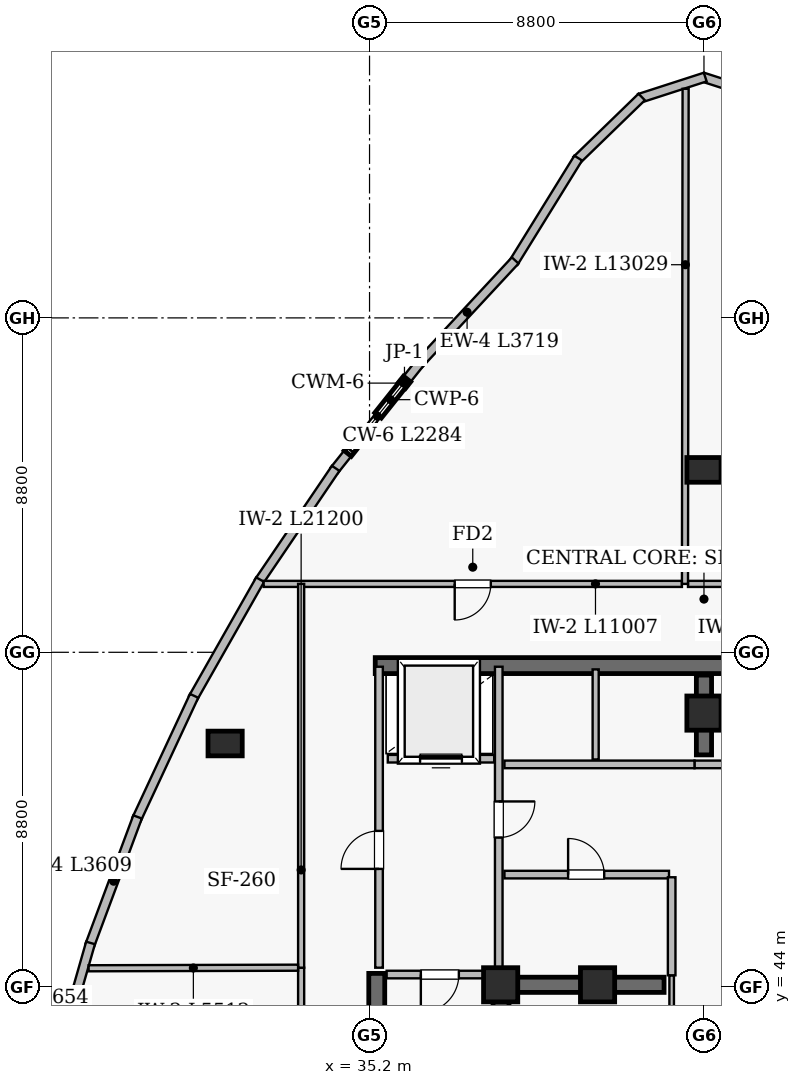
"""IFC4 building model, lengths in metres.
Left out: names, types, materials, properties, quantities, classifications, styles, units other than length and angle.
Written with IfcOpenShell. Run it as: python <this file> out.ifc"""

import sys

from ifc_helpers import new_model, si_unit, direction, frame, frame_2d, origin, origin_2d, place, context, subcontext, project, spatial, rectangle, extrude, element, fill, save


model = new_model("IFC4")
c1 = context("Model", 3, precision=1e-05, world=origin(), true_north=direction((0.0, 1.0)))
c2 = subcontext(c1, "Body", "Model", "MODEL_VIEW")
j1 = project(units=[si_unit("LENGTHUNIT", "METRE"), si_unit("PLANEANGLEUNIT", "RADIAN")], contexts=[c1])
p1 = place(None, origin())
s1 = spatial("IfcSite", under=j1, at=p1, CompositionType="ELEMENT")
p2 = place(p1, origin())
s2 = spatial("IfcBuilding", under=s1, at=p2, CompositionType="ELEMENT")
p3 = place(p2, frame((0.0, 0.0, 300.8)))
s3 = spatial("IfcBuildingStorey", under=s2, at=p3, CompositionType="ELEMENT", Elevation=300.8)
p4 = place(p3, frame((35.35, 52.45, 0.0), z_axis=(0.0, 0.0, 1.0), x_axis=(1.0, 0.0, 0.0)))
e1 = element("IfcWall", 1, at=p4, inside=s3, PredefinedType="SHEAR", context=c2, shape_type="SweptSolid", body=[
    extrude(rectangle(XDim=17.3, YDim=0.42, at=frame_2d((8.65, 0.0))), origin(), (0.0, 0.0, 1.0), 5.74),
])
p5 = place(p3, frame((35.39, 35.18, 0.0), z_axis=(0.0, 0.0, 1.0), x_axis=(0.0, 1.0, 0.0)))
e2 = element("IfcWall", 2, at=p5, inside=s3, PredefinedType="SHEAR", context=c2, shape_type="SweptSolid", body=[
    extrude(rectangle(XDim=9.17, YDim=0.42, at=frame_2d((4.585, 0.0))), origin(), (0.0, 0.0, 1.0), 5.74),
])
p6 = place(p3, frame((38.66, 35.4, 0.0), z_axis=(0.0, 0.0, 1.0), x_axis=(0.0, 1.0, 0.0)))
e3 = element("IfcWall", 3, at=p6, inside=s3, PredefinedType="SHEAR", context=c2, shape_type="SweptSolid", body=[
    extrude(rectangle(XDim=8.95, YDim=0.42, at=frame_2d((4.475, 0.0))), origin(), (0.0, 0.0, 1.0), 5.74),
])
p7 = place(p3, frame((44.0, 50.1, 0.0), z_axis=(0.0, 0.0, 1.0), x_axis=(0.0, 1.0, 0.0)))
e4 = element("IfcWall", 4, at=p7, inside=s3, PredefinedType="SHEAR", context=c2, shape_type="SweptSolid", body=[
    extrude(rectangle(XDim=2.1, YDim=0.4, at=frame_2d((1.05, 0.0))), origin(), (0.0, 0.0, 1.0), 5.74),
])
p8 = place(p3, frame((38.75, 44.05, 0.0), z_axis=(0.0, 0.0, 1.0), x_axis=(1.0, 0.0, 0.0)))
e5 = element("IfcWall", 5, at=p8, inside=s3, PredefinedType="SHEAR", context=c2, shape_type="SweptSolid", body=[
    extrude(rectangle(XDim=4.2, YDim=0.4, at=frame_2d((2.1, 0.0))), origin(), (0.0, 0.0, 1.0), 5.74),
])
for number, where, z_axis, x_axis in (
    (6, (38.65, 44.05, 0.0), (0.0, 0.0, 1.0), (1.0, 0.0, 0.0)),
    (7, (44.0, 51.2, 0.0), (0.0, 0.0, 1.0), (1.0, 0.0, 0.0)),
    (8, (41.2, 44.05, 0.0), (0.0, 0.0, 1.0), (1.0, 0.0, 0.0)),
):
    element("IfcColumn", number, at=place(p3, frame(where, z_axis=z_axis, x_axis=x_axis)), inside=s3, PredefinedType="COLUMN", context=c2, shape_type="SweptSolid", body=[
        extrude(rectangle(XDim=0.9, YDim=0.9, at=origin_2d()), origin(), (0.0, 0.0, 1.0), 6.0),
    ])
for number, where, z_axis, x_axis in (
    (9, (44.0, 57.6, 0.0), (0.0, 0.0, 1.0), (1.0, 0.0, 0.0)),
    (10, (31.4, 50.4, 0.0), (0.0, 0.0, 1.0), (1.0, 0.0, 0.0)),
):
    element("IfcColumn", number, at=place(p3, frame(where, z_axis=z_axis, x_axis=x_axis)), inside=s3, PredefinedType="COLUMN", context=c2, shape_type="SweptSolid", body=[
        extrude(rectangle(XDim=0.9, YDim=0.65, at=origin_2d()), origin(), (0.0, 0.0, 1.0), 6.0),
    ])
for number, where, z_axis, x_axis in (
    (11, (45.697, 67.378, 0.0), (0.0, 0.0, 1.0), (-0.952, 0.308, 0.0)),
    (12, (44.033, 67.938, 0.0), (0.0, 0.0, 1.0), (-0.952, -0.308, 0.0)),
):
    element("IfcWall", number, at=place(p3, frame(where, z_axis=z_axis, x_axis=x_axis)), inside=s3, PredefinedType="SOLIDWALL", context=c2, shape_type="SweptSolid", body=[
        extrude(rectangle(XDim=1.818, YDim=0.24, at=frame_2d((0.909, 0.0))), origin(), (0.0, 0.0, 1.0), 5.74),
    ])
p9 = place(p3, frame((42.361, 67.414, 0.0), z_axis=(0.0, 0.0, 1.0), x_axis=(-0.717711443968, -0.69634063733, 0.0)))
e13 = element("IfcWall", 13, at=p9, inside=s3, PredefinedType="SOLIDWALL", context=c2, shape_type="SweptSolid", body=[
    extrude(rectangle(XDim=2.388, YDim=0.24, at=frame_2d((1.194, 0.0))), origin(), (0.0, 0.0, 1.0), 5.74),
])
p10 = place(p3, frame((40.691, 65.805, 0.0), z_axis=(0.0, 0.0, 1.0), x_axis=(-0.526110187608, -0.850416410058, 0.0)))
e14 = element("IfcWall", 14, at=p10, inside=s3, PredefinedType="SOLIDWALL", context=c2, shape_type="SweptSolid", body=[
    extrude(rectangle(XDim=3.233, YDim=0.24, at=frame_2d((1.616, 0.0))), origin(), (0.0, 0.0, 1.0), 5.74),
])
p11 = place(p3, frame((39.033, 63.112, 0.0), z_axis=(0.0, 0.0, 1.0), x_axis=(-0.68087147599, -0.732402917241, 0.0)))
e15 = element("IfcWall", 15, at=p11, inside=s3, PredefinedType="SOLIDWALL", context=c2, shape_type="SweptSolid", body=[
    extrude(rectangle(XDim=3.719, YDim=0.24, at=frame_2d((1.859, 0.0))), origin(), (0.0, 0.0, 1.0), 5.74),
])
p12 = place(p3, frame((36.546, 60.441, 0.0), z_axis=(0.0, 0.0, 1.0), x_axis=(-0.623554366926, -0.781779989183, 0.0)))
e16 = element("IfcWall", 16, at=p12, inside=s3, PredefinedType="SOLIDWALL", context=c2, shape_type="SweptSolid", body=[
    extrude(rectangle(XDim=0.705, YDim=0.24, at=frame_2d((0.353, 0.0))), origin(), (0.0, 0.0, 1.0), 5.74),
])
p13 = place(p3, frame((34.707, 58.135, 0.0), z_axis=(0.0, 0.0, 1.0), x_axis=(-0.62368040626, -0.781679442513, 0.0)))
e17 = element("IfcWall", 17, at=p13, inside=s3, PredefinedType="SOLIDWALL", context=c2, shape_type="SweptSolid", body=[
    extrude(rectangle(XDim=0.705, YDim=0.24, at=frame_2d((0.352, 0.0))), origin(), (0.0, 0.0, 1.0), 5.74),
])
p14 = place(p3, frame((34.309, 57.641, 0.0), z_axis=(0.0, 0.0, 1.0), x_axis=(-0.560819727484, -0.827937940467, 0.0)))
e18 = element("IfcWall", 18, at=p14, inside=s3, PredefinedType="SOLIDWALL", context=c2, shape_type="SweptSolid", body=[
    extrude(rectangle(XDim=3.609, YDim=0.24, at=frame_2d((1.805, 0.0))), origin(), (0.0, 0.0, 1.0), 5.74),
])
p15 = place(p3, frame((32.322, 54.712, 0.0), z_axis=(0.0, 0.0, 1.0), x_axis=(-0.49340236427, -0.869801188165, 0.0)))
e19 = element("IfcWall", 19, at=p15, inside=s3, PredefinedType="SOLIDWALL", context=c2, shape_type="SweptSolid", body=[
    extrude(rectangle(XDim=3.587, YDim=0.24, at=frame_2d((1.793, 0.0))), origin(), (0.0, 0.0, 1.0), 5.74),
])
p16 = place(p3, frame((30.584, 51.654, 0.0), z_axis=(0.0, 0.0, 1.0), x_axis=(-0.422322757118, -0.906445524464, 0.0)))
e20 = element("IfcWall", 20, at=p16, inside=s3, PredefinedType="SOLIDWALL", context=c2, shape_type="SweptSolid", body=[
    extrude(rectangle(XDim=3.587, YDim=0.24, at=frame_2d((1.793, 0.0))), origin(), (0.0, 0.0, 1.0), 5.74),
])
p17 = place(p3, frame((29.096, 48.467, 0.0), z_axis=(0.0, 0.0, 1.0), x_axis=(-0.349054279873, -0.937102507574, 0.0)))
e21 = element("IfcWall", 21, at=p17, inside=s3, PredefinedType="SOLIDWALL", context=c2, shape_type="SweptSolid", body=[
    extrude(rectangle(XDim=3.609, YDim=0.24, at=frame_2d((1.805, 0.0))), origin(), (0.0, 0.0, 1.0), 5.74),
])
p18 = place(p3, frame((27.858, 45.152, 0.0), z_axis=(0.0, 0.0, 1.0), x_axis=(-0.274897629025, -0.961473501224, 0.0)))
e22 = element("IfcWall", 22, at=p18, inside=s3, PredefinedType="SOLIDWALL", context=c2, shape_type="SweptSolid", body=[
    extrude(rectangle(XDim=3.654, YDim=0.24, at=frame_2d((1.827, 0.0))), origin(), (0.0, 0.0, 1.0), 5.74),
])
p19 = place(p3, frame((33.4, 44.5, 0.0), z_axis=(0.0, 0.0, 1.0), x_axis=(0.0, -1.0, 0.0)))
e23 = element("IfcWall", 23, at=p19, inside=s3, PredefinedType="SOLIDWALL", context=c2, shape_type="SweptSolid", body=[
    extrude(rectangle(XDim=11.1, YDim=0.16, at=frame_2d((5.55, 0.0))), origin(), (0.0, 0.0, 1.0), 5.24),
])
p20 = place(p19, frame((5.435, 0.0, 0.0)))
e24 = element("IfcOpeningElement", 24, at=p20, cuts=e23, PredefinedType="OPENING", context=c2, shape_type="SweptSolid", body=[
    extrude(rectangle(XDim=0.95, YDim=2.15, at=frame_2d((0.475, 1.075))), frame((0.0, 0.09, 0.0), z_axis=(0.0, -1.0, 0.0), x_axis=(1.0, 0.0, 0.0)), (0.0, 0.0, 1.0), 0.18),
])
p21 = place(p3, frame((43.42, 54.6, 0.0), z_axis=(0.0, 0.0, 1.0), x_axis=(-1.0, 0.0, 0.0)))
e25 = element("IfcWall", 25, at=p21, inside=s3, PredefinedType="SOLIDWALL", context=c2, shape_type="SweptSolid", body=[
    extrude(rectangle(XDim=11.007, YDim=0.16, at=frame_2d((5.503, 0.0))), origin(), (0.0, 0.0, 1.0), 5.24),
])
p22 = place(p21, frame((5.029, 0.0, 0.0)))
e26 = element("IfcOpeningElement", 26, at=p22, cuts=e25, PredefinedType="OPENING", context=c2, shape_type="SweptSolid", body=[
    extrude(rectangle(XDim=0.95, YDim=2.15, at=frame_2d((0.475, 1.075))), frame((0.0, 0.09, 0.0), z_axis=(0.0, -1.0, 0.0), x_axis=(1.0, 0.0, 0.0)), (0.0, 0.0, 1.0), 0.18),
])
p23 = place(p3, frame((52.47, 54.6, 0.0), z_axis=(0.0, 0.0, 1.0), x_axis=(-1.0, 0.0, 0.0)))
e27 = element("IfcWall", 27, at=p23, inside=s3, PredefinedType="SOLIDWALL", context=c2, shape_type="SweptSolid", body=[
    extrude(rectangle(XDim=8.89, YDim=0.16, at=frame_2d((4.445, 0.0))), origin(), (0.0, 0.0, 1.0), 5.24),
])
p24 = place(p23, frame((3.97, 0.0, 0.0)))
e28 = element("IfcOpeningElement", 28, at=p24, cuts=e27, PredefinedType="OPENING", context=c2, shape_type="SweptSolid", body=[
    extrude(rectangle(XDim=0.95, YDim=2.15, at=frame_2d((0.475, 1.075))), frame((0.0, 0.09, 0.0), z_axis=(0.0, -1.0, 0.0), x_axis=(1.0, 0.0, 0.0)), (0.0, 0.0, 1.0), 0.18),
])
p25 = place(p3, frame((43.15, 35.6, 0.0), z_axis=(0.0, 0.0, 1.0), x_axis=(0.0, 1.0, 0.0)))
e29 = element("IfcWall", 29, at=p25, inside=s3, PredefinedType="PARTITIONING", context=c2, shape_type="SweptSolid", body=[
    extrude(rectangle(XDim=8.7, YDim=0.12, at=frame_2d((4.35, 0.0))), origin(), (0.0, 0.0, 1.0), 5.74),
])
p26 = place(p25, frame((0.925, 0.0, 0.0)))
e30 = element("IfcOpeningElement", 30, at=p26, cuts=e29, PredefinedType="OPENING", context=c2, shape_type="SweptSolid", body=[
    extrude(rectangle(XDim=0.85, YDim=2.1, at=frame_2d((0.425, 1.05))), frame((0.0, 0.07, 0.0), z_axis=(0.0, -1.0, 0.0), x_axis=(1.0, 0.0, 0.0)), (0.0, 0.0, 1.0), 0.14),
])
p27 = place(p25, frame((3.695, 0.0, 0.0)))
e31 = element("IfcOpeningElement", 31, at=p27, cuts=e29, PredefinedType="OPENING", context=c2, shape_type="SweptSolid", body=[
    extrude(rectangle(XDim=0.85, YDim=2.1, at=frame_2d((0.425, 1.05))), frame((0.0, 0.07, 0.0), z_axis=(0.0, -1.0, 0.0), x_axis=(1.0, 0.0, 0.0)), (0.0, 0.0, 1.0), 0.14),
])
p28 = place(p25, frame((6.475, 0.0, 0.0)))
e32 = element("IfcOpeningElement", 32, at=p28, cuts=e29, PredefinedType="OPENING", context=c2, shape_type="SweptSolid", body=[
    extrude(rectangle(XDim=0.85, YDim=2.1, at=frame_2d((0.425, 1.05))), frame((0.0, 0.07, 0.0), z_axis=(0.0, -1.0, 0.0), x_axis=(1.0, 0.0, 0.0)), (0.0, 0.0, 1.0), 0.14),
])
p29 = place(p3, frame((35.45, 44.5, 0.0), z_axis=(0.0, 0.0, 1.0), x_axis=(0.0, 1.0, 0.0)))
e33 = element("IfcWall", 33, at=p29, inside=s3, PredefinedType="SOLIDWALL", context=c2, shape_type="SweptSolid", body=[
    extrude(rectangle(XDim=7.92, YDim=0.2, at=frame_2d((3.96, 0.0))), origin(), (0.0, 0.0, 1.0), 5.74),
])
p30 = place(p29, frame((2.6, 0.0, 0.0)))
e34 = element("IfcOpeningElement", 34, at=p30, cuts=e33, PredefinedType="OPENING", context=c2, shape_type="SweptSolid", body=[
    extrude(rectangle(XDim=1.0, YDim=2.15, at=frame_2d((0.5, 1.075))), frame((0.0, 0.11, 0.0), z_axis=(0.0, -1.0, 0.0), x_axis=(1.0, 0.0, 0.0)), (0.0, 0.0, 1.0), 0.22),
])
p31 = place(p3, frame((38.6, 44.5, 0.0), z_axis=(0.0, 0.0, 1.0), x_axis=(0.0, 1.0, 0.0)))
e35 = element("IfcWall", 35, at=p31, inside=s3, PredefinedType="SOLIDWALL", context=c2, shape_type="SweptSolid", body=[
    extrude(rectangle(XDim=7.92, YDim=0.2, at=frame_2d((3.96, 0.0))), origin(), (0.0, 0.0, 1.0), 5.74),
])
p32 = place(p31, frame((3.425, 0.0, 0.0)))
e36 = element("IfcOpeningElement", 36, at=p32, cuts=e35, PredefinedType="OPENING", context=c2, shape_type="SweptSolid", body=[
    extrude(rectangle(XDim=0.95, YDim=2.15, at=frame_2d((0.475, 1.075))), frame((0.0, 0.11, 0.0), z_axis=(0.0, -1.0, 0.0), x_axis=(1.0, 0.0, 0.0)), (0.0, 0.0, 1.0), 0.22),
])
p33 = place(p3, frame((43.75, 49.85, 0.0), z_axis=(0.0, 0.0, 1.0), x_axis=(1.0, 0.0, 0.0)))
e37 = element("IfcWall", 37, at=p33, inside=s3, PredefinedType="SOLIDWALL", context=c2, shape_type="SweptSolid", body=[
    extrude(rectangle(XDim=5.5, YDim=0.2, at=frame_2d((2.75, 0.0))), origin(), (0.0, 0.0, 1.0), 4.828),
])
p34 = place(p33, frame((3.5, 0.0, 0.0)))
e38 = element("IfcOpeningElement", 38, at=p34, cuts=e37, PredefinedType="OPENING", context=c2, shape_type="SweptSolid", body=[
    extrude(rectangle(XDim=1.1, YDim=2.15, at=frame_2d((0.55, 1.075))), frame((0.0, 0.11, 0.0), z_axis=(0.0, -1.0, 0.0), x_axis=(1.0, 0.0, 0.0)), (0.0, 0.0, 1.0), 0.22),
])
p35 = place(p3, frame((38.75, 46.95, 0.0), z_axis=(0.0, 0.0, 1.0), x_axis=(1.0, 0.0, 0.0)))
e39 = element("IfcWall", 39, at=p35, inside=s3, PredefinedType="SOLIDWALL", context=c2, shape_type="SweptSolid", body=[
    extrude(rectangle(XDim=4.33, YDim=0.2, at=frame_2d((2.165, 0.0))), origin(), (0.0, 0.0, 1.0), 5.74),
])
p36 = place(p35, frame((1.675, 0.0, 0.0)))
e40 = element("IfcOpeningElement", 40, at=p36, cuts=e39, PredefinedType="OPENING", context=c2, shape_type="SweptSolid", body=[
    extrude(rectangle(XDim=0.95, YDim=2.1, at=frame_2d((0.475, 1.05))), frame((0.0, 0.11, 0.0), z_axis=(0.0, -1.0, 0.0), x_axis=(1.0, 0.0, 0.0)), (0.0, 0.0, 1.0), 0.22),
])
p37 = place(p3, frame((35.65, 44.32, 0.0), z_axis=(0.0, 0.0, 1.0), x_axis=(1.0, 0.0, 0.0)))
e41 = element("IfcWall", 41, at=p37, inside=s3, PredefinedType="SOLIDWALL", context=c2, shape_type="SweptSolid", body=[
    extrude(rectangle(XDim=2.8, YDim=0.2, at=frame_2d((1.4, 0.0))), origin(), (0.0, 0.0, 1.0), 5.74),
])
p38 = place(p37, frame((0.9, 0.0, 0.0)))
e42 = element("IfcOpeningElement", 42, at=p38, cuts=e41, PredefinedType="OPENING", context=c2, shape_type="SweptSolid", body=[
    extrude(rectangle(XDim=1.0, YDim=2.15, at=frame_2d((0.5, 1.075))), frame((0.0, 0.11, 0.0), z_axis=(0.0, -1.0, 0.0), x_axis=(1.0, 0.0, 0.0)), (0.0, 0.0, 1.0), 0.22),
])
p39 = place(p3, frame((35.68, 50.0, 0.0), z_axis=(0.0, 0.0, 1.0), x_axis=(1.0, 0.0, 0.0)))
e43 = element("IfcWall", 43, at=p39, inside=s3, PredefinedType="SOLIDWALL", context=c2, shape_type="SweptSolid", body=[
    extrude(rectangle(XDim=2.8, YDim=0.2, at=frame_2d((1.4, 0.0))), origin(), (0.0, 0.0, 1.0), 5.74),
])
p40 = place(p39, frame((0.85, 0.0, 0.0)))
e44 = element("IfcOpeningElement", 44, at=p40, cuts=e43, PredefinedType="OPENING", context=c2, shape_type="SweptSolid", body=[
    extrude(rectangle(XDim=1.1, YDim=2.15, at=frame_2d((0.55, 1.075))), frame((0.0, 0.11, 0.0), z_axis=(0.0, -1.0, 0.0), x_axis=(1.0, 0.0, 0.0)), (0.0, 0.0, 1.0), 0.22),
])
p41 = place(p3, frame((43.5, 54.6, 0.0), z_axis=(0.0, 0.0, 1.0), x_axis=(0.001311695457, 0.999999139727, 0.0)))
e45 = element("IfcWall", 45, at=p41, inside=s3, PredefinedType="SOLIDWALL", context=c2, shape_type="SweptSolid", body=[
    extrude(rectangle(XDim=13.029, YDim=0.16, at=frame_2d((6.514, 0.0))), origin(), (0.0, 0.0, 1.0), 5.24),
])
p42 = place(p3, frame((33.4, 54.6, 0.0), z_axis=(0.0, 0.0, 1.0), x_axis=(0.0, -1.0, 0.0)))
e46 = element("IfcWall", 46, at=p42, inside=s3, PredefinedType="SOLIDWALL", context=c2, shape_type="SweptSolid", body=[
    extrude(rectangle(XDim=10.1, YDim=0.16, at=frame_2d((5.05, 0.0))), origin(), (0.0, 0.0, 1.0), 5.24),
])
p43 = place(p3, frame((33.32, 44.5, 0.0), z_axis=(0.0, 0.0, 1.0), x_axis=(-0.999996349983, -0.002701854868, 0.0)))
e47 = element("IfcWall", 47, at=p43, inside=s3, PredefinedType="SOLIDWALL", context=c2, shape_type="SweptSolid", body=[
    extrude(rectangle(XDim=5.512, YDim=0.16, at=frame_2d((2.756, 0.0))), origin(), (0.0, 0.0, 1.0), 5.24),
])
p44 = place(p3, frame((38.75, 49.85, 0.0), z_axis=(0.0, 0.0, 1.0), x_axis=(1.0, 0.0, 0.0)))
e48 = element("IfcWall", 48, at=p44, inside=s3, PredefinedType="SOLIDWALL", context=c2, shape_type="SweptSolid", body=[
    extrude(rectangle(XDim=5.0, YDim=0.2, at=frame_2d((2.5, 0.0))), origin(), (0.0, 0.0, 1.0), 5.74),
])
p45 = place(p3, frame((43.15, 44.3, 0.0), z_axis=(0.0, 0.0, 1.0), x_axis=(0.0, 1.0, 0.0)))
e49 = element("IfcWall", 49, at=p45, inside=s3, PredefinedType="SOLIDWALL", context=c2, shape_type="SweptSolid", body=[
    extrude(rectangle(XDim=2.58, YDim=0.2, at=frame_2d((1.29, 0.0))), origin(), (0.0, 0.0, 1.0), 5.74),
])
p46 = place(p3, frame((41.15, 49.98, 0.0), z_axis=(0.0, 0.0, 1.0), x_axis=(0.0, 1.0, 0.0)))
e50 = element("IfcWall", 50, at=p46, inside=s3, PredefinedType="SOLIDWALL", context=c2, shape_type="SweptSolid", body=[
    extrude(rectangle(XDim=2.37, YDim=0.16, at=frame_2d((1.185, 0.0))), origin(), (0.0, 0.0, 1.0), 5.74),
])
p47 = place(p38, frame((1.0, 0.0, 0.0), z_axis=(0.0, 0.0, 1.0), x_axis=(-1.0, 0.0, 0.0)))
e51 = element("IfcDoor", 51, at=p47, inside=s3, OperationType="SINGLE_SWING_LEFT", PredefinedType="DOOR", context=c2, shape_type="SweptSolid", body=[
    extrude(rectangle(XDim=1.0, YDim=2.15, at=frame_2d((0.5, 1.075))), frame((0.0, 0.025, 0.0), z_axis=(0.0, -1.0, 0.0), x_axis=(1.0, 0.0, 0.0)), (0.0, 0.0, 1.0), 0.05),
])
fill(e42, e51)
p48 = place(p30, origin())
e52 = element("IfcDoor", 52, at=p48, inside=s3, OperationType="SINGLE_SWING_LEFT", PredefinedType="DOOR", context=c2, shape_type="SweptSolid", body=[
    extrude(rectangle(XDim=1.0, YDim=2.15, at=frame_2d((0.5, 1.075))), frame((0.0, 0.025, 0.0), z_axis=(0.0, -1.0, 0.0), x_axis=(1.0, 0.0, 0.0)), (0.0, 0.0, 1.0), 0.05),
])
fill(e34, e52)
p49 = place(p32, frame((0.95, 0.0, 0.0), z_axis=(0.0, 0.0, 1.0), x_axis=(-1.0, 0.0, 0.0)))
e53 = element("IfcDoor", 53, at=p49, inside=s3, OperationType="SINGLE_SWING_RIGHT", PredefinedType="DOOR", context=c2, shape_type="SweptSolid", body=[
    extrude(rectangle(XDim=0.95, YDim=2.15, at=frame_2d((0.475, 1.075))), frame((0.0, 0.025, 0.0), z_axis=(0.0, -1.0, 0.0), x_axis=(1.0, 0.0, 0.0)), (0.0, 0.0, 1.0), 0.05),
])
fill(e36, e53)
p50 = place(p40, origin())
e54 = element("IfcDoor", 54, at=p50, inside=s3, OperationType="SLIDING_TO_LEFT", PredefinedType="DOOR", context=c2, shape_type="SweptSolid", body=[
    extrude(rectangle(XDim=1.1, YDim=2.15, at=frame_2d((0.55, 1.075))), frame((0.0, 0.025, 0.0), z_axis=(0.0, -1.0, 0.0), x_axis=(1.0, 0.0, 0.0)), (0.0, 0.0, 1.0), 0.05),
])
fill(e44, e54)
p51 = place(p36, origin())
e55 = element("IfcDoor", 55, at=p51, inside=s3, OperationType="SINGLE_SWING_LEFT", PredefinedType="DOOR", context=c2, shape_type="SweptSolid", body=[
    extrude(rectangle(XDim=0.95, YDim=2.1, at=frame_2d((0.475, 1.05))), frame((0.0, 0.025, 0.0), z_axis=(0.0, -1.0, 0.0), x_axis=(1.0, 0.0, 0.0)), (0.0, 0.0, 1.0), 0.05),
])
fill(e40, e55)
p52 = place(p22, origin())
e56 = element("IfcDoor", 56, at=p52, inside=s3, OperationType="SINGLE_SWING_RIGHT", PredefinedType="DOOR", context=c2, shape_type="SweptSolid", body=[
    extrude(rectangle(XDim=0.95, YDim=2.15, at=frame_2d((0.475, 1.075))), frame((0.0, 0.025, 0.0), z_axis=(0.0, -1.0, 0.0), x_axis=(1.0, 0.0, 0.0)), (0.0, 0.0, 1.0), 0.05),
])
fill(e26, e56)
save(model, sys.argv[1])
